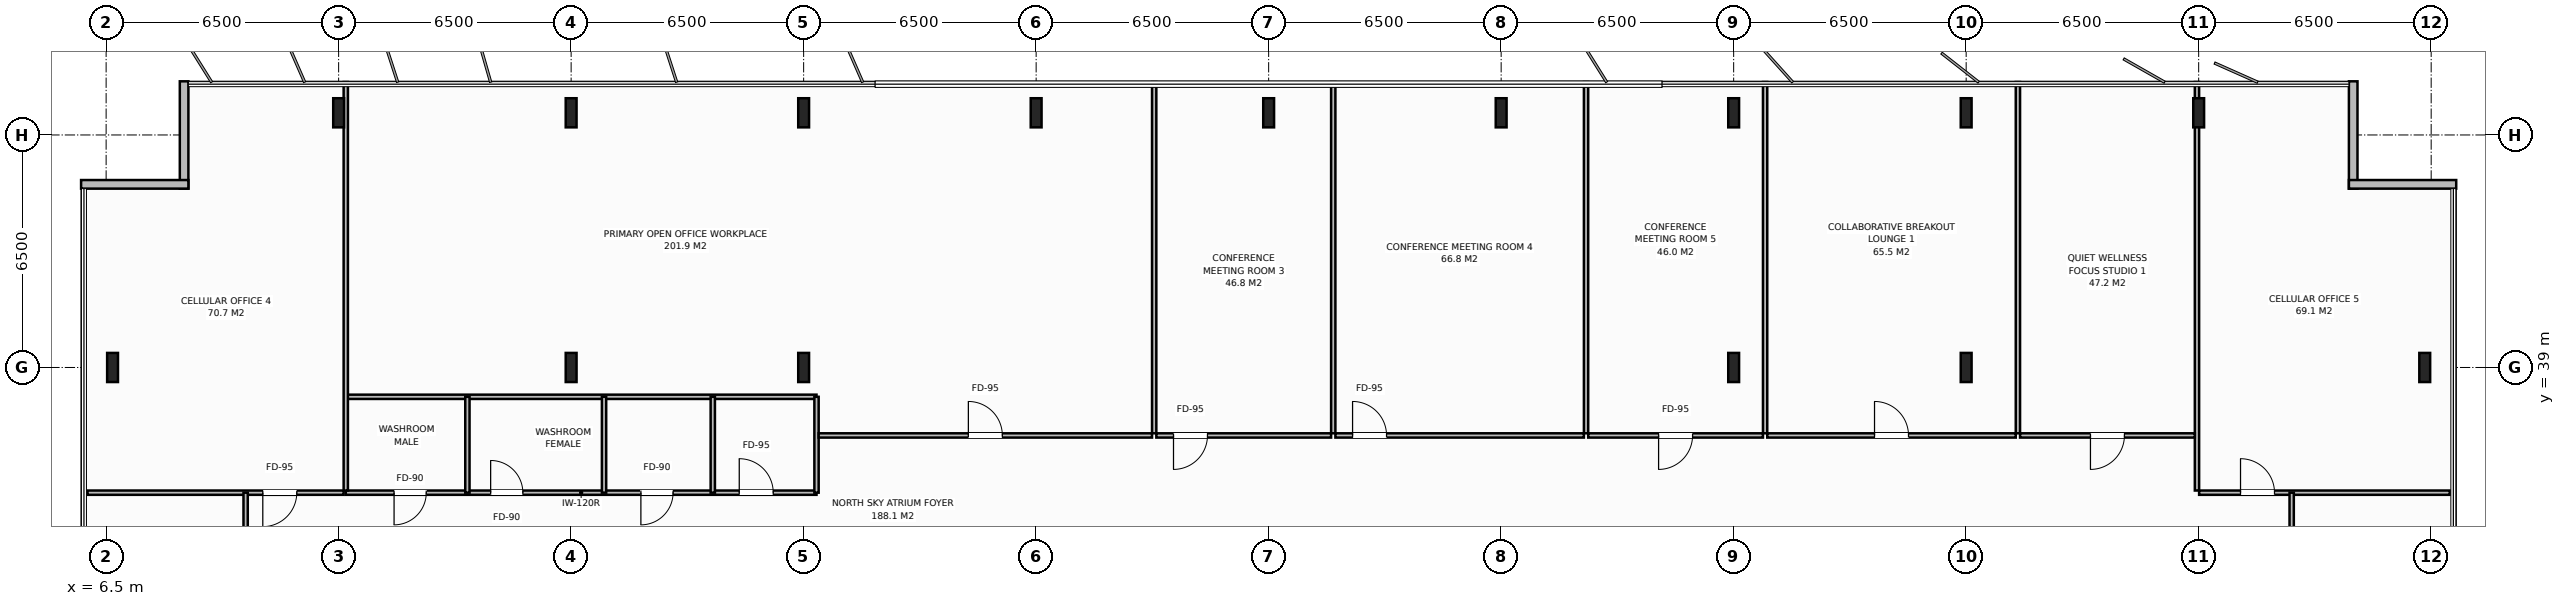
"""IFC4 building model, lengths in metres.
Left out: names, types, materials, properties, quantities, classifications, styles, units other than length and angle.
Written with IfcOpenShell. Run it as: python <this file> out.ifc"""

import sys

from ifc_helpers import new_model, si_unit, direction, frame, frame_2d, origin, origin_2d, place, context, subcontext, project, spatial, rectangle, i_section, extrude, element, fill, save


model = new_model("IFC4")
c1 = context("Model", 3, precision=1e-05, world=origin(), true_north=direction((0.0, 1.0)))
c2 = subcontext(c1, "Body", "Model", "MODEL_VIEW")
j1 = project(units=[si_unit("LENGTHUNIT", "METRE"), si_unit("PLANEANGLEUNIT", "RADIAN")], contexts=[c1])
p1 = place(None, origin())
s1 = spatial("IfcSite", under=j1, at=p1, CompositionType="ELEMENT")
p2 = place(p1, origin())
s2 = spatial("IfcBuilding", under=s1, at=p2, CompositionType="ELEMENT")
p3 = place(p2, frame((0.0, 0.0, 225.2)))
s3 = spatial("IfcBuildingStorey", under=s2, at=p3, CompositionType="ELEMENT", Elevation=225.2)
for number, where, z_axis, x_axis in (
    (1, (19.5, 39.0, 0.0), (0.0, 0.0, 1.0), (1.0, 0.0, 0.0)),
    (2, (58.5, 39.0, 0.0), (0.0, 0.0, 1.0), (1.0, 0.0, 0.0)),
    (3, (26.0, 39.0, 0.0), (0.0, 0.0, 1.0), (1.0, 0.0, 0.0)),
    (4, (52.0, 39.0, 0.0), (0.0, 0.0, 1.0), (1.0, 0.0, 0.0)),
    (5, (13.0, 46.12, 0.0), (0.0, 0.0, 1.0), (1.0, 0.0, 0.0)),
    (6, (19.5, 46.12, 0.0), (0.0, 0.0, 1.0), (1.0, 0.0, 0.0)),
    (7, (26.0, 46.12, 0.0), (0.0, 0.0, 1.0), (1.0, 0.0, 0.0)),
    (8, (32.5, 46.12, 0.0), (0.0, 0.0, 1.0), (1.0, 0.0, 0.0)),
    (9, (39.0, 46.12, 0.0), (0.0, 0.0, 1.0), (1.0, 0.0, 0.0)),
    (10, (45.5, 46.12, 0.0), (0.0, 0.0, 1.0), (1.0, 0.0, 0.0)),
    (11, (52.0, 46.12, 0.0), (0.0, 0.0, 1.0), (1.0, 0.0, 0.0)),
    (12, (58.5, 46.12, 0.0), (0.0, 0.0, 1.0), (1.0, 0.0, 0.0)),
    (13, (65.0, 46.12, 0.0), (0.0, 0.0, 1.0), (1.0, 0.0, 0.0)),
    (14, (6.68, 39.0, 0.0), (0.0, 0.0, 1.0), (1.0, 0.0, 0.0)),
    (15, (71.32, 39.0, 0.0), (0.0, 0.0, 1.0), (1.0, 0.0, 0.0)),
):
    element("IfcColumn", number, at=place(p3, frame(where, z_axis=z_axis, x_axis=x_axis)), inside=s3, PredefinedType="COLUMN", context=c2, shape_type="SweptSolid", body=[
        extrude(i_section(OverallWidth=0.303, OverallDepth=0.814, WebThickness=0.021, FlangeThickness=0.04, at=origin_2d()), origin(), (0.0, 0.0, 1.0), 3.8),
    ])
for number, where, z_axis, x_axis in (
    (16, (8.68, 44.0, 0.0), (0.0, 0.0, 1.0), (0.0, 1.0, 0.0)),
    (17, (5.8, 44.12, 0.0), (0.0, 0.0, 1.0), (1.0, 0.0, 0.0)),
    (18, (69.32, 47.0, 0.0), (0.0, 0.0, 1.0), (0.0, -1.0, 0.0)),
    (19, (69.2, 44.12, 0.0), (0.0, 0.0, 1.0), (1.0, 0.0, 0.0)),
):
    element("IfcWall", number, at=place(p3, frame(where, z_axis=z_axis, x_axis=x_axis)), inside=s3, PredefinedType="STANDARD", context=c2, shape_type="SweptSolid", body=[
        extrude(rectangle(XDim=3.0, YDim=0.24, at=frame_2d((1.5, 0.0))), origin(), (0.0, 0.0, 1.0), 3.58),
    ])
p4 = place(p3, frame((13.2, 35.5, 0.0), z_axis=(0.0, 0.0, 1.0), x_axis=(1.0, 0.0, 0.0)))
e20 = element("IfcWall", 20, at=p4, inside=s3, PredefinedType="PARTITIONING", context=c2, shape_type="SweptSolid", body=[
    extrude(rectangle(XDim=13.16, YDim=0.12, at=frame_2d((6.58, 0.0))), origin(), (0.0, 0.0, 1.0), 3.58),
])
p5 = place(p4, frame((1.35, 0.0, 0.0)))
e21 = element("IfcOpeningElement", 21, at=p5, cuts=e20, PredefinedType="OPENING", context=c2, shape_type="SweptSolid", body=[
    extrude(rectangle(XDim=0.9, YDim=2.15, at=frame_2d((0.45, 1.075))), frame((0.0, 0.07, 0.0), z_axis=(0.0, -1.0, 0.0), x_axis=(1.0, 0.0, 0.0)), (0.0, 0.0, 1.0), 0.14),
])
p6 = place(p4, frame((4.05, 0.0, 0.0)))
e22 = element("IfcOpeningElement", 22, at=p6, cuts=e20, PredefinedType="OPENING", context=c2, shape_type="SweptSolid", body=[
    extrude(rectangle(XDim=0.9, YDim=2.15, at=frame_2d((0.45, 1.075))), frame((0.0, 0.07, 0.0), z_axis=(0.0, -1.0, 0.0), x_axis=(1.0, 0.0, 0.0)), (0.0, 0.0, 1.0), 0.14),
])
p7 = place(p4, frame((8.25, 0.0, 0.0)))
e23 = element("IfcOpeningElement", 23, at=p7, cuts=e20, PredefinedType="OPENING", context=c2, shape_type="SweptSolid", body=[
    extrude(rectangle(XDim=0.9, YDim=2.15, at=frame_2d((0.45, 1.075))), frame((0.0, 0.07, 0.0), z_axis=(0.0, -1.0, 0.0), x_axis=(1.0, 0.0, 0.0)), (0.0, 0.0, 1.0), 0.14),
])
p8 = place(p4, frame((11.0, 0.0, 0.0)))
e24 = element("IfcOpeningElement", 24, at=p8, cuts=e20, PredefinedType="OPENING", context=c2, shape_type="SweptSolid", body=[
    extrude(rectangle(XDim=0.95, YDim=2.15, at=frame_2d((0.475, 1.075))), frame((0.0, 0.07, 0.0), z_axis=(0.0, -1.0, 0.0), x_axis=(1.0, 0.0, 0.0)), (0.0, 0.0, 1.0), 0.14),
])
p9 = place(p3, frame((13.2, 38.18, 0.0), z_axis=(0.0, 0.0, 1.0), x_axis=(1.0, 0.0, 0.0)))
e25 = element("IfcWall", 25, at=p9, inside=s3, PredefinedType="PARTITIONING", context=c2, shape_type="SweptSolid", body=[
    extrude(rectangle(XDim=13.16, YDim=0.12, at=frame_2d((6.58, 0.0))), origin(), (0.0, 0.0, 1.0), 3.58),
])
for number, where, z_axis, x_axis in (
    (26, (16.6, 35.5, 0.0), (0.0, 0.0, 1.0), (0.0, 1.0, 0.0)),
    (27, (20.42, 35.5, 0.0), (0.0, 0.0, 1.0), (0.0, 1.0, 0.0)),
    (28, (23.46, 35.5, 0.0), (0.0, 0.0, 1.0), (0.0, 1.0, 0.0)),
    (29, (26.36, 35.5, 0.0), (0.0, 0.0, 1.0), (0.0, 1.0, 0.0)),
):
    element("IfcWall", number, at=place(p3, frame(where, z_axis=z_axis, x_axis=x_axis)), inside=s3, PredefinedType="PARTITIONING", context=c2, shape_type="SweptSolid", body=[
        extrude(rectangle(XDim=2.68, YDim=0.12, at=frame_2d((1.34, 0.0))), origin(), (0.0, 0.0, 1.0), 3.58),
    ])
p10 = place(p3, frame((13.2, 35.56, 0.0), z_axis=(0.0, 0.0, 1.0), x_axis=(0.0, 1.0, 0.0)))
e30 = element("IfcWall", 30, at=p10, inside=s3, PredefinedType="PARTITIONING", context=c2, shape_type="SweptSolid", body=[
    extrude(rectangle(XDim=11.42, YDim=0.12, at=frame_2d((5.71, 0.0))), origin(), (0.0, 0.0, 1.0), 2.88),
])
p11 = place(p3, frame((5.98, 35.5, 0.0), z_axis=(0.0, 0.0, 1.0), x_axis=(1.0, 0.0, 0.0)))
e31 = element("IfcWall", 31, at=p11, inside=s3, PredefinedType="PARTITIONING", context=c2, shape_type="SweptSolid", body=[
    extrude(rectangle(XDim=7.16, YDim=0.12, at=frame_2d((3.58, 0.0))), origin(), (0.0, 0.0, 1.0), 3.58),
])
p12 = place(p11, frame((4.9, 0.0, 0.0)))
e32 = element("IfcOpeningElement", 32, at=p12, cuts=e31, PredefinedType="OPENING", context=c2, shape_type="SweptSolid", body=[
    extrude(rectangle(XDim=0.95, YDim=2.15, at=frame_2d((0.475, 1.075))), frame((0.0, 0.07, 0.0), z_axis=(0.0, -1.0, 0.0), x_axis=(1.0, 0.0, 0.0)), (0.0, 0.0, 1.0), 0.14),
])
p13 = place(p3, frame((35.8, 37.16, 0.0), z_axis=(0.0, 0.0, 1.0), x_axis=(0.0, 1.0, 0.0)))
e33 = element("IfcWall", 33, at=p13, inside=s3, PredefinedType="PARTITIONING", context=c2, shape_type="SweptSolid", body=[
    extrude(rectangle(XDim=9.82, YDim=0.12, at=frame_2d((4.91, 0.0))), origin(), (0.0, 0.0, 1.0), 3.58),
])
p14 = place(p3, frame((26.42, 37.1, 0.0), z_axis=(0.0, 0.0, 1.0), x_axis=(1.0, 0.0, 0.0)))
e34 = element("IfcWall", 34, at=p14, inside=s3, PredefinedType="PARTITIONING", context=c2, shape_type="SweptSolid", body=[
    extrude(rectangle(XDim=9.32, YDim=0.12, at=frame_2d((4.66, 0.0))), origin(), (0.0, 0.0, 1.0), 3.58),
])
p15 = place(p14, frame((4.185, 0.0, 0.0)))
e35 = element("IfcOpeningElement", 35, at=p15, cuts=e34, PredefinedType="OPENING", context=c2, shape_type="SweptSolid", body=[
    extrude(rectangle(XDim=0.95, YDim=2.15, at=frame_2d((0.475, 1.075))), frame((0.0, 0.07, 0.0), z_axis=(0.0, -1.0, 0.0), x_axis=(1.0, 0.0, 0.0)), (0.0, 0.0, 1.0), 0.14),
])
p16 = place(p3, frame((40.806, 37.16, 0.0), z_axis=(0.0, 0.0, 1.0), x_axis=(0.0, 1.0, 0.0)))
e36 = element("IfcWall", 36, at=p16, inside=s3, PredefinedType="PARTITIONING", context=c2, shape_type="SweptSolid", body=[
    extrude(rectangle(XDim=9.82, YDim=0.12, at=frame_2d((4.91, 0.0))), origin(), (0.0, 0.0, 1.0), 3.58),
])
p17 = place(p3, frame((35.86, 37.1, 0.0), z_axis=(0.0, 0.0, 1.0), x_axis=(1.0, 0.0, 0.0)))
e37 = element("IfcWall", 37, at=p17, inside=s3, PredefinedType="PARTITIONING", context=c2, shape_type="SweptSolid", body=[
    extrude(rectangle(XDim=4.886, YDim=0.12, at=frame_2d((2.443, 0.0))), origin(), (0.0, 0.0, 1.0), 3.58),
])
p18 = place(p17, frame((0.48, 0.0, 0.0)))
e38 = element("IfcOpeningElement", 38, at=p18, cuts=e37, PredefinedType="OPENING", context=c2, shape_type="SweptSolid", body=[
    extrude(rectangle(XDim=0.95, YDim=2.15, at=frame_2d((0.475, 1.075))), frame((0.0, 0.07, 0.0), z_axis=(0.0, -1.0, 0.0), x_axis=(1.0, 0.0, 0.0)), (0.0, 0.0, 1.0), 0.14),
])
p19 = place(p3, frame((47.873, 37.16, 0.0), z_axis=(0.0, 0.0, 1.0), x_axis=(0.0, 1.0, 0.0)))
e39 = element("IfcWall", 39, at=p19, inside=s3, PredefinedType="PARTITIONING", context=c2, shape_type="SweptSolid", body=[
    extrude(rectangle(XDim=9.82, YDim=0.12, at=frame_2d((4.91, 0.0))), origin(), (0.0, 0.0, 1.0), 3.58),
])
p20 = place(p3, frame((40.866, 37.1, 0.0), z_axis=(0.0, 0.0, 1.0), x_axis=(1.0, 0.0, 0.0)))
e40 = element("IfcWall", 40, at=p20, inside=s3, PredefinedType="PARTITIONING", context=c2, shape_type="SweptSolid", body=[
    extrude(rectangle(XDim=6.947, YDim=0.12, at=frame_2d((3.474, 0.0))), origin(), (0.0, 0.0, 1.0), 3.58),
])
p21 = place(p20, frame((0.48, 0.0, 0.0)))
e41 = element("IfcOpeningElement", 41, at=p21, cuts=e40, PredefinedType="OPENING", context=c2, shape_type="SweptSolid", body=[
    extrude(rectangle(XDim=0.95, YDim=2.15, at=frame_2d((0.475, 1.075))), frame((0.0, 0.07, 0.0), z_axis=(0.0, -1.0, 0.0), x_axis=(1.0, 0.0, 0.0)), (0.0, 0.0, 1.0), 0.14),
])
p22 = place(p3, frame((52.879, 37.16, 0.0), z_axis=(0.0, 0.0, 1.0), x_axis=(0.0, 1.0, 0.0)))
e42 = element("IfcWall", 42, at=p22, inside=s3, PredefinedType="PARTITIONING", context=c2, shape_type="SweptSolid", body=[
    extrude(rectangle(XDim=9.82, YDim=0.12, at=frame_2d((4.91, 0.0))), origin(), (0.0, 0.0, 1.0), 3.58),
])
p23 = place(p3, frame((47.933, 37.1, 0.0), z_axis=(0.0, 0.0, 1.0), x_axis=(1.0, 0.0, 0.0)))
e43 = element("IfcWall", 43, at=p23, inside=s3, PredefinedType="PARTITIONING", context=c2, shape_type="SweptSolid", body=[
    extrude(rectangle(XDim=4.886, YDim=0.12, at=frame_2d((2.443, 0.0))), origin(), (0.0, 0.0, 1.0), 3.58),
])
p24 = place(p23, frame((1.968, 0.0, 0.0)))
e44 = element("IfcOpeningElement", 44, at=p24, cuts=e43, PredefinedType="OPENING", context=c2, shape_type="SweptSolid", body=[
    extrude(rectangle(XDim=0.95, YDim=2.15, at=frame_2d((0.475, 1.075))), frame((0.0, 0.07, 0.0), z_axis=(0.0, -1.0, 0.0), x_axis=(1.0, 0.0, 0.0)), (0.0, 0.0, 1.0), 0.14),
])
p25 = place(p3, frame((59.947, 37.16, 0.0), z_axis=(0.0, 0.0, 1.0), x_axis=(0.0, 1.0, 0.0)))
e45 = element("IfcWall", 45, at=p25, inside=s3, PredefinedType="PARTITIONING", context=c2, shape_type="SweptSolid", body=[
    extrude(rectangle(XDim=9.82, YDim=0.12, at=frame_2d((4.91, 0.0))), origin(), (0.0, 0.0, 1.0), 3.58),
])
p26 = place(p3, frame((52.939, 37.1, 0.0), z_axis=(0.0, 0.0, 1.0), x_axis=(1.0, 0.0, 0.0)))
e46 = element("IfcWall", 46, at=p26, inside=s3, PredefinedType="PARTITIONING", context=c2, shape_type="SweptSolid", body=[
    extrude(rectangle(XDim=6.948, YDim=0.12, at=frame_2d((3.474, 0.0))), origin(), (0.0, 0.0, 1.0), 3.58),
])
p27 = place(p26, frame((2.999, 0.0, 0.0)))
e47 = element("IfcOpeningElement", 47, at=p27, cuts=e46, PredefinedType="OPENING", context=c2, shape_type="SweptSolid", body=[
    extrude(rectangle(XDim=0.95, YDim=2.15, at=frame_2d((0.475, 1.075))), frame((0.0, 0.07, 0.0), z_axis=(0.0, -1.0, 0.0), x_axis=(1.0, 0.0, 0.0)), (0.0, 0.0, 1.0), 0.14),
])
p28 = place(p3, frame((64.953, 35.56, 0.0), z_axis=(0.0, 0.0, 1.0), x_axis=(0.0, 1.0, 0.0)))
e48 = element("IfcWall", 48, at=p28, inside=s3, PredefinedType="PARTITIONING", context=c2, shape_type="SweptSolid", body=[
    extrude(rectangle(XDim=11.42, YDim=0.12, at=frame_2d((5.71, 0.0))), origin(), (0.0, 0.0, 1.0), 2.88),
])
p29 = place(p3, frame((60.007, 37.1, 0.0), z_axis=(0.0, 0.0, 1.0), x_axis=(1.0, 0.0, 0.0)))
e49 = element("IfcWall", 49, at=p29, inside=s3, PredefinedType="PARTITIONING", context=c2, shape_type="SweptSolid", body=[
    extrude(rectangle(XDim=4.886, YDim=0.12, at=frame_2d((2.443, 0.0))), origin(), (0.0, 0.0, 1.0), 3.58),
])
p30 = place(p29, frame((1.968, 0.0, 0.0)))
e50 = element("IfcOpeningElement", 50, at=p30, cuts=e49, PredefinedType="OPENING", context=c2, shape_type="SweptSolid", body=[
    extrude(rectangle(XDim=0.95, YDim=2.15, at=frame_2d((0.475, 1.075))), frame((0.0, 0.07, 0.0), z_axis=(0.0, -1.0, 0.0), x_axis=(1.0, 0.0, 0.0)), (0.0, 0.0, 1.0), 0.14),
])
p31 = place(p3, frame((65.013, 35.5, 0.0), z_axis=(0.0, 0.0, 1.0), x_axis=(1.0, 0.0, 0.0)))
e51 = element("IfcWall", 51, at=p31, inside=s3, PredefinedType="PARTITIONING", context=c2, shape_type="SweptSolid", body=[
    extrude(rectangle(XDim=7.007, YDim=0.12, at=frame_2d((3.504, 0.0))), origin(), (0.0, 0.0, 1.0), 3.58),
])
p32 = place(p31, frame((1.157, 0.0, 0.0)))
e52 = element("IfcOpeningElement", 52, at=p32, cuts=e51, PredefinedType="OPENING", context=c2, shape_type="SweptSolid", body=[
    extrude(rectangle(XDim=0.95, YDim=2.15, at=frame_2d((0.475, 1.075))), frame((0.0, 0.07, 0.0), z_axis=(0.0, -1.0, 0.0), x_axis=(1.0, 0.0, 0.0)), (0.0, 0.0, 1.0), 0.14),
])
p33 = place(p3, frame((10.4, 29.167, 0.0), z_axis=(0.0, 0.0, 1.0), x_axis=(0.0, 1.0, 0.0)))
e53 = element("IfcWall", 53, at=p33, inside=s3, PredefinedType="PARTITIONING", context=c2, shape_type="SweptSolid", body=[
    extrude(rectangle(XDim=6.333, YDim=0.12, at=frame_2d((3.167, 0.0))), origin(), (0.0, 0.0, 1.0), 3.58),
])
p34 = place(p33, frame((1.642, 0.0, 0.0)))
e54 = element("IfcOpeningElement", 54, at=p34, cuts=e53, PredefinedType="OPENING", context=c2, shape_type="SweptSolid", body=[
    extrude(rectangle(XDim=0.95, YDim=2.15, at=frame_2d((0.475, 1.075))), frame((0.0, 0.07, 0.0), z_axis=(0.0, -1.0, 0.0), x_axis=(1.0, 0.0, 0.0)), (0.0, 0.0, 1.0), 0.14),
])
p35 = place(p3, frame((67.6, 16.5, 0.0), z_axis=(0.0, 0.0, 1.0), x_axis=(0.0, 1.0, 0.0)))
e55 = element("IfcWall", 55, at=p35, inside=s3, PredefinedType="PARTITIONING", context=c2, shape_type="SweptSolid", body=[
    extrude(rectangle(XDim=19.0, YDim=0.12, at=frame_2d((9.5, 0.0))), origin(), (0.0, 0.0, 1.0), 3.58),
])
p36 = place(p35, frame((9.025, 0.0, 0.0)))
e56 = element("IfcOpeningElement", 56, at=p36, cuts=e55, PredefinedType="OPENING", context=c2, shape_type="SweptSolid", body=[
    extrude(rectangle(XDim=0.95, YDim=2.15, at=frame_2d((0.475, 1.075))), frame((0.0, 0.07, 0.0), z_axis=(0.0, -1.0, 0.0), x_axis=(1.0, 0.0, 0.0)), (0.0, 0.0, 1.0), 0.14),
])
p37 = place(p5, origin())
e57 = element("IfcDoor", 57, at=p37, inside=s3, OperationType="SINGLE_SWING_RIGHT", PredefinedType="DOOR", context=c2, shape_type="SweptSolid", body=[
    extrude(rectangle(XDim=0.9, YDim=2.15, at=frame_2d((0.45, 1.075))), frame((0.0, 0.025, 0.0), z_axis=(0.0, -1.0, 0.0), x_axis=(1.0, 0.0, 0.0)), (0.0, 0.0, 1.0), 0.05),
])
fill(e21, e57)
p38 = place(p6, origin())
e58 = element("IfcDoor", 58, at=p38, inside=s3, OperationType="SINGLE_SWING_LEFT", PredefinedType="DOOR", context=c2, shape_type="SweptSolid", body=[
    extrude(rectangle(XDim=0.9, YDim=2.15, at=frame_2d((0.45, 1.075))), frame((0.0, 0.025, 0.0), z_axis=(0.0, -1.0, 0.0), x_axis=(1.0, 0.0, 0.0)), (0.0, 0.0, 1.0), 0.05),
])
fill(e22, e58)
p39 = place(p7, origin())
e59 = element("IfcDoor", 59, at=p39, inside=s3, OperationType="SINGLE_SWING_RIGHT", PredefinedType="DOOR", context=c2, shape_type="SweptSolid", body=[
    extrude(rectangle(XDim=0.9, YDim=2.15, at=frame_2d((0.45, 1.075))), frame((0.0, 0.025, 0.0), z_axis=(0.0, -1.0, 0.0), x_axis=(1.0, 0.0, 0.0)), (0.0, 0.0, 1.0), 0.05),
])
fill(e23, e59)
p40 = place(p8, origin())
e60 = element("IfcDoor", 60, at=p40, inside=s3, OperationType="SINGLE_SWING_LEFT", PredefinedType="DOOR", context=c2, shape_type="SweptSolid", body=[
    extrude(rectangle(XDim=0.95, YDim=2.15, at=frame_2d((0.475, 1.075))), frame((0.0, 0.025, 0.0), z_axis=(0.0, -1.0, 0.0), x_axis=(1.0, 0.0, 0.0)), (0.0, 0.0, 1.0), 0.05),
])
fill(e24, e60)
p41 = place(p12, origin())
e61 = element("IfcDoor", 61, at=p41, inside=s3, OperationType="SINGLE_SWING_RIGHT", PredefinedType="DOOR", context=c2, shape_type="SweptSolid", body=[
    extrude(rectangle(XDim=0.95, YDim=2.15, at=frame_2d((0.475, 1.075))), frame((0.0, 0.025, 0.0), z_axis=(0.0, -1.0, 0.0), x_axis=(1.0, 0.0, 0.0)), (0.0, 0.0, 1.0), 0.05),
])
fill(e32, e61)
p42 = place(p15, origin())
e62 = element("IfcDoor", 62, at=p42, inside=s3, OperationType="SINGLE_SWING_LEFT", PredefinedType="DOOR", context=c2, shape_type="SweptSolid", body=[
    extrude(rectangle(XDim=0.95, YDim=2.15, at=frame_2d((0.475, 1.075))), frame((0.0, 0.025, 0.0), z_axis=(0.0, -1.0, 0.0), x_axis=(1.0, 0.0, 0.0)), (0.0, 0.0, 1.0), 0.05),
])
fill(e35, e62)
p43 = place(p18, origin())
e63 = element("IfcDoor", 63, at=p43, inside=s3, OperationType="SINGLE_SWING_RIGHT", PredefinedType="DOOR", context=c2, shape_type="SweptSolid", body=[
    extrude(rectangle(XDim=0.95, YDim=2.15, at=frame_2d((0.475, 1.075))), frame((0.0, 0.025, 0.0), z_axis=(0.0, -1.0, 0.0), x_axis=(1.0, 0.0, 0.0)), (0.0, 0.0, 1.0), 0.05),
])
fill(e38, e63)
p44 = place(p21, origin())
e64 = element("IfcDoor", 64, at=p44, inside=s3, OperationType="SINGLE_SWING_LEFT", PredefinedType="DOOR", context=c2, shape_type="SweptSolid", body=[
    extrude(rectangle(XDim=0.95, YDim=2.15, at=frame_2d((0.475, 1.075))), frame((0.0, 0.025, 0.0), z_axis=(0.0, -1.0, 0.0), x_axis=(1.0, 0.0, 0.0)), (0.0, 0.0, 1.0), 0.05),
])
fill(e41, e64)
p45 = place(p24, origin())
e65 = element("IfcDoor", 65, at=p45, inside=s3, OperationType="SINGLE_SWING_RIGHT", PredefinedType="DOOR", context=c2, shape_type="SweptSolid", body=[
    extrude(rectangle(XDim=0.95, YDim=2.15, at=frame_2d((0.475, 1.075))), frame((0.0, 0.025, 0.0), z_axis=(0.0, -1.0, 0.0), x_axis=(1.0, 0.0, 0.0)), (0.0, 0.0, 1.0), 0.05),
])
fill(e44, e65)
p46 = place(p27, origin())
e66 = element("IfcDoor", 66, at=p46, inside=s3, OperationType="SINGLE_SWING_LEFT", PredefinedType="DOOR", context=c2, shape_type="SweptSolid", body=[
    extrude(rectangle(XDim=0.95, YDim=2.15, at=frame_2d((0.475, 1.075))), frame((0.0, 0.025, 0.0), z_axis=(0.0, -1.0, 0.0), x_axis=(1.0, 0.0, 0.0)), (0.0, 0.0, 1.0), 0.05),
])
fill(e47, e66)
p47 = place(p30, origin())
e67 = element("IfcDoor", 67, at=p47, inside=s3, OperationType="SINGLE_SWING_RIGHT", PredefinedType="DOOR", context=c2, shape_type="SweptSolid", body=[
    extrude(rectangle(XDim=0.95, YDim=2.15, at=frame_2d((0.475, 1.075))), frame((0.0, 0.025, 0.0), z_axis=(0.0, -1.0, 0.0), x_axis=(1.0, 0.0, 0.0)), (0.0, 0.0, 1.0), 0.05),
])
fill(e50, e67)
p48 = place(p32, origin())
e68 = element("IfcDoor", 68, at=p48, inside=s3, OperationType="SINGLE_SWING_LEFT", PredefinedType="DOOR", context=c2, shape_type="SweptSolid", body=[
    extrude(rectangle(XDim=0.95, YDim=2.15, at=frame_2d((0.475, 1.075))), frame((0.0, 0.025, 0.0), z_axis=(0.0, -1.0, 0.0), x_axis=(1.0, 0.0, 0.0)), (0.0, 0.0, 1.0), 0.05),
])
fill(e52, e68)
save(model, sys.argv[1])
